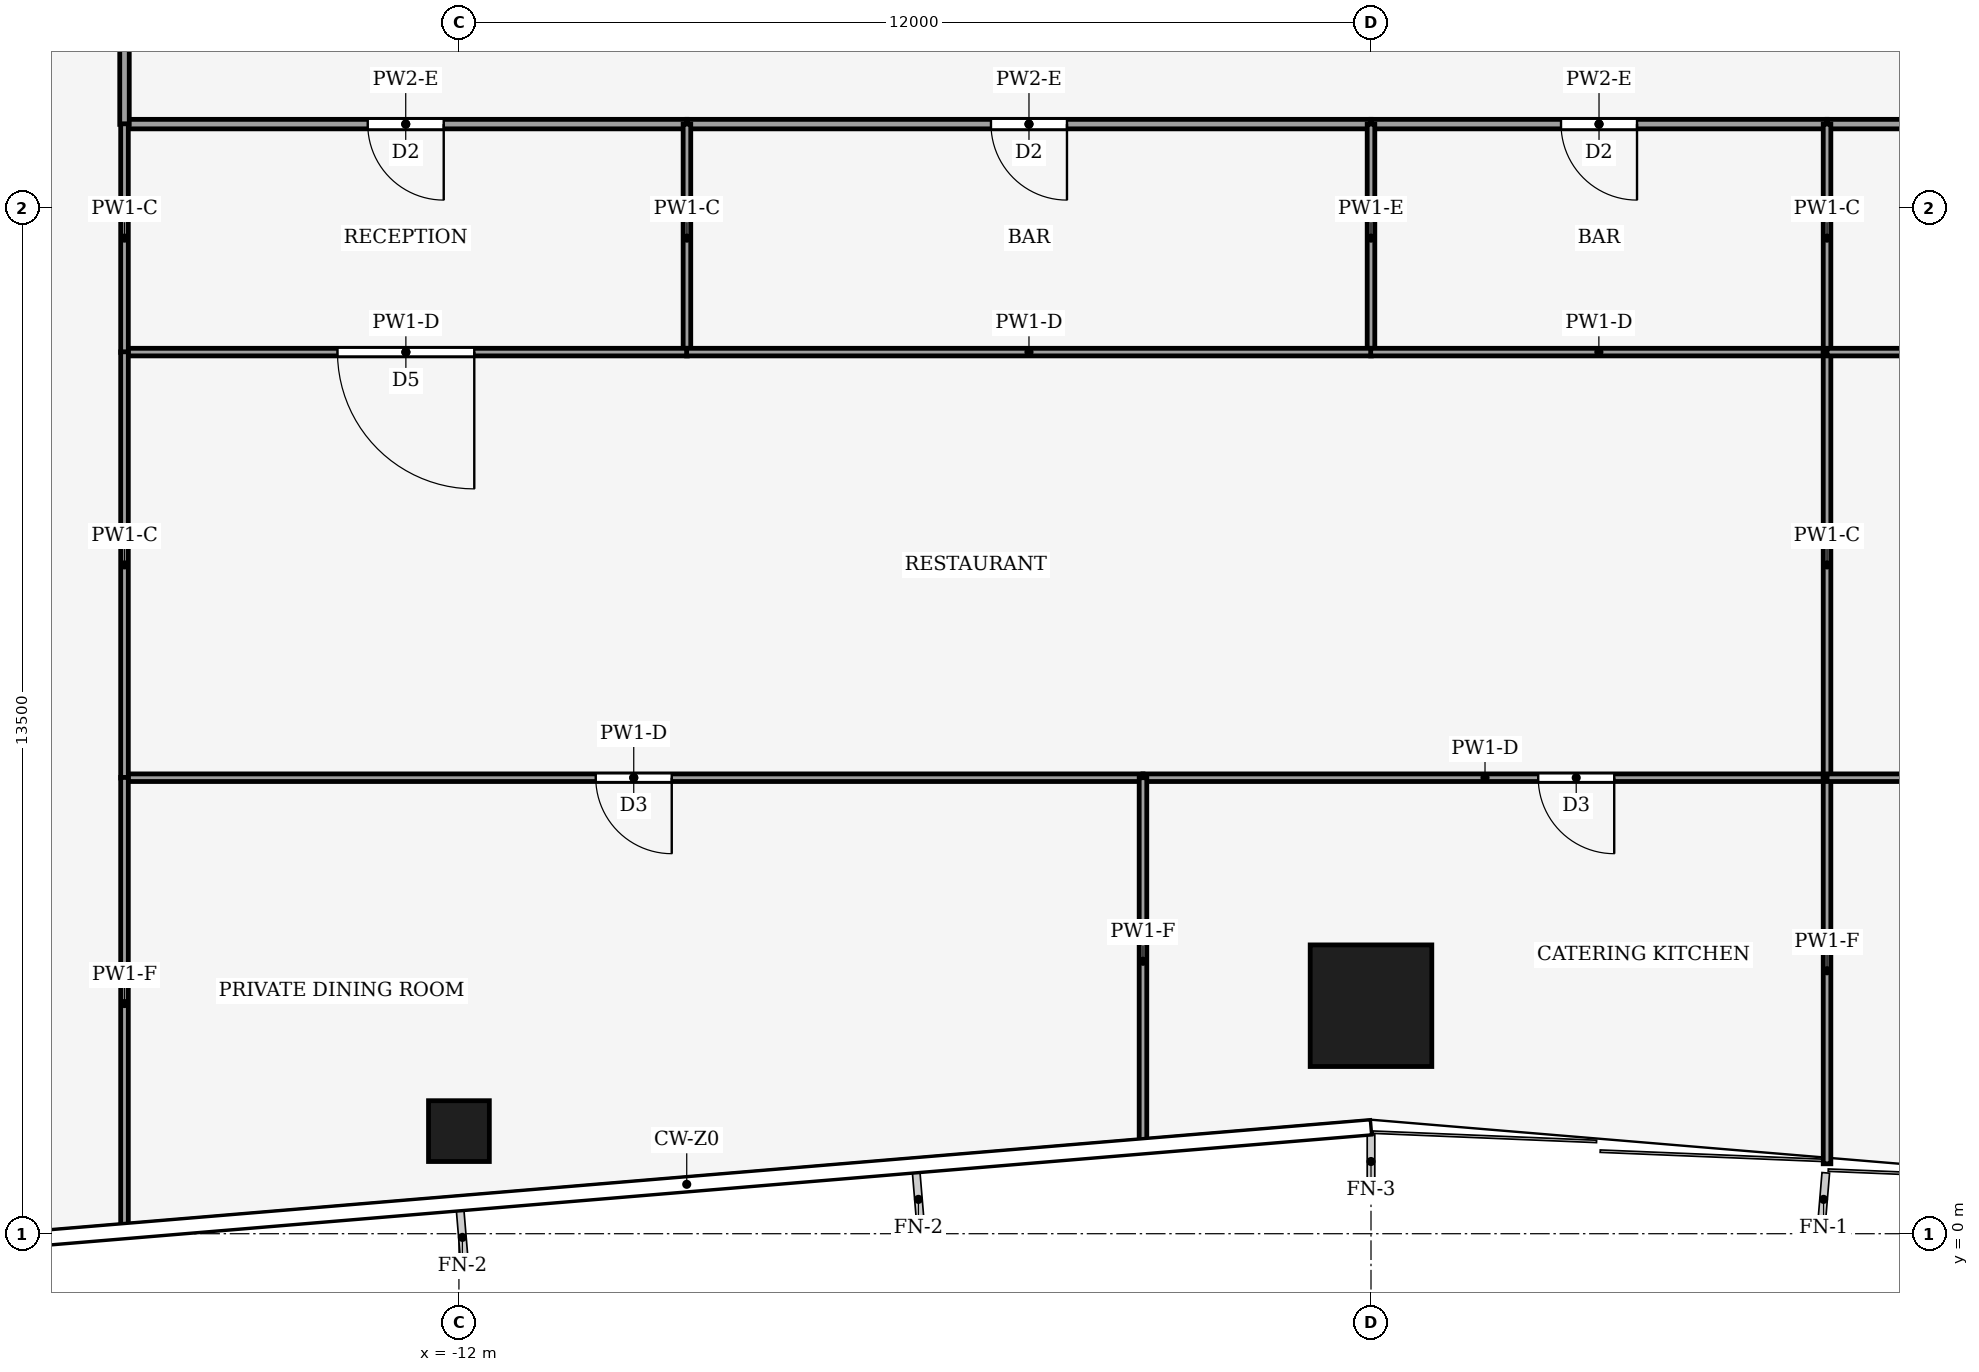
"""IFC4 building model, lengths in metres.
Left out: names, types, materials, properties, quantities, classifications, styles, units other than length and angle.
Written with IfcOpenShell. Run it as: python <this file> out.ifc"""

import sys

from ifc_helpers import new_model, si_unit, direction, frame, frame_2d, origin, origin_2d, place, context, subcontext, project, spatial, rectangle, hollow_rectangle, extrude, element, fill, save


model = new_model("IFC4")
c1 = context("Model", 3, precision=1e-05, world=origin(), true_north=direction((0.0, 1.0)))
c2 = subcontext(c1, "Body", "Model", "MODEL_VIEW")
j1 = project(units=[si_unit("LENGTHUNIT", "METRE"), si_unit("PLANEANGLEUNIT", "RADIAN")], contexts=[c1])
p1 = place(None, origin())
s1 = spatial("IfcSite", under=j1, at=p1, CompositionType="ELEMENT")
p2 = place(p1, origin())
s2 = spatial("IfcBuilding", under=s1, at=p2, CompositionType="ELEMENT")
p3 = place(p2, frame((0.0, 0.0, 14.0)))
s3 = spatial("IfcBuildingStorey", under=s2, at=p3, CompositionType="ELEMENT", Elevation=14.0)
p4 = place(p3, frame((0.0, 3.0, 0.0), z_axis=(0.0, 0.0, 1.0), x_axis=(1.0, 0.0, 0.0)))
e1 = element("IfcColumn", 1, at=p4, inside=s3, PredefinedType="COLUMN", context=c2, shape_type="SweptSolid", body=[
    extrude(hollow_rectangle(XDim=1.6, YDim=1.6, WallThickness=0.09, at=origin_2d()), origin(), (0.0, 0.0, 1.0), 4.0),
])
p5 = place(p3, frame((-12.0, 1.35, 0.0), z_axis=(0.0, 0.0, 1.0), x_axis=(1.0, 0.0, 0.0)))
e2 = element("IfcColumn", 2, at=p5, inside=s3, PredefinedType="COLUMN", context=c2, shape_type="SweptSolid", body=[
    extrude(hollow_rectangle(XDim=0.8, YDim=0.8, WallThickness=0.04, at=origin_2d()), origin(), (0.0, 0.0, 1.0), 4.0),
])
p6 = place(p3, frame((-9.0, 14.6, 0.0), z_axis=(0.0, 0.0, 1.0), x_axis=(-1.0, 0.0, 0.0)))
e3 = element("IfcWall", 3, at=p6, inside=s3, PredefinedType="PARTITIONING", context=c2, shape_type="SweptSolid", body=[
    extrude(rectangle(XDim=7.4, YDim=0.125, at=frame_2d((3.7, 0.0))), origin(), (0.0, 0.0, 1.0), 3.29),
])
p7 = place(p6, frame((3.2, 0.0, 0.0)))
e4 = element("IfcOpeningElement", 4, at=p7, cuts=e3, PredefinedType="OPENING", context=c2, shape_type="SweptSolid", body=[
    extrude(rectangle(XDim=1.0, YDim=2.1, at=frame_2d((0.5, 1.05))), frame((0.0, 0.073, 0.0), z_axis=(0.0, -1.0, 0.0), x_axis=(1.0, 0.0, 0.0)), (0.0, 0.0, 1.0), 0.145),
])
p8 = place(p3, frame((0.0, 14.6, 0.0), z_axis=(0.0, 0.0, 1.0), x_axis=(-1.0, 0.0, 0.0)))
e5 = element("IfcWall", 5, at=p8, inside=s3, PredefinedType="PARTITIONING", context=c2, shape_type="SweptSolid", body=[
    extrude(rectangle(XDim=9.0, YDim=0.125, at=frame_2d((4.5, 0.0))), origin(), (0.0, 0.0, 1.0), 3.29),
])
p9 = place(p8, frame((4.0, 0.0, 0.0)))
e6 = element("IfcOpeningElement", 6, at=p9, cuts=e5, PredefinedType="OPENING", context=c2, shape_type="SweptSolid", body=[
    extrude(rectangle(XDim=1.0, YDim=2.1, at=frame_2d((0.5, 1.05))), frame((0.0, 0.073, 0.0), z_axis=(0.0, -1.0, 0.0), x_axis=(1.0, 0.0, 0.0)), (0.0, 0.0, 1.0), 0.145),
])
p10 = place(p3, frame((6.0, 14.6, 0.0), z_axis=(0.0, 0.0, 1.0), x_axis=(-1.0, 0.0, 0.0)))
e7 = element("IfcWall", 7, at=p10, inside=s3, PredefinedType="PARTITIONING", context=c2, shape_type="SweptSolid", body=[
    extrude(rectangle(XDim=6.0, YDim=0.125, at=frame_2d((3.0, 0.0))), origin(), (0.0, 0.0, 1.0), 3.29),
])
p11 = place(p10, frame((2.5, 0.0, 0.0)))
e8 = element("IfcOpeningElement", 8, at=p11, cuts=e7, PredefinedType="OPENING", context=c2, shape_type="SweptSolid", body=[
    extrude(rectangle(XDim=1.0, YDim=2.1, at=frame_2d((0.5, 1.05))), frame((0.0, 0.073, 0.0), z_axis=(0.0, -1.0, 0.0), x_axis=(1.0, 0.0, 0.0)), (0.0, 0.0, 1.0), 0.145),
])
p12 = place(p3, frame((12.0, 14.6, 0.0), z_axis=(0.0, 0.0, 1.0), x_axis=(-1.0, 0.0, 0.0)))
e9 = element("IfcWall", 9, at=p12, inside=s3, PredefinedType="PARTITIONING", context=c2, shape_type="SweptSolid", body=[
    extrude(rectangle(XDim=6.0, YDim=0.125, at=frame_2d((3.0, 0.0))), origin(), (0.0, 0.0, 1.0), 3.29),
])
p13 = place(p12, frame((2.5, 0.0, 0.0)))
e10 = element("IfcOpeningElement", 10, at=p13, cuts=e9, PredefinedType="OPENING", context=c2, shape_type="SweptSolid", body=[
    extrude(rectangle(XDim=1.0, YDim=2.1, at=frame_2d((0.5, 1.05))), frame((0.0, 0.073, 0.0), z_axis=(0.0, -1.0, 0.0), x_axis=(1.0, 0.0, 0.0)), (0.0, 0.0, 1.0), 0.145),
])
p14 = place(p3, frame((-16.4, 14.596, 0.0), z_axis=(0.0, 0.0, 1.0), x_axis=(0.0, 1.0, 0.0)))
e11 = element("IfcWall", 11, at=p14, inside=s3, PredefinedType="PARTITIONING", context=c2, shape_type="SweptSolid", body=[
    extrude(rectangle(XDim=6.404, YDim=0.125, at=frame_2d((3.202, 0.0))), origin(), (0.0, 0.0, 1.0), 3.14),
])
p15 = place(p14, frame((2.702, 0.0, 0.0)))
e12 = element("IfcOpeningElement", 12, at=p15, cuts=e11, PredefinedType="OPENING", context=c2, shape_type="SweptSolid", body=[
    extrude(rectangle(XDim=1.0, YDim=2.1, at=frame_2d((0.5, 1.05))), frame((0.0, 0.073, 0.0), z_axis=(0.0, -1.0, 0.0), x_axis=(1.0, 0.0, 0.0)), (0.0, 0.0, 1.0), 0.145),
])
p16 = place(p3, frame((-9.0, 11.6, 0.0), z_axis=(0.0, 0.0, 1.0), x_axis=(0.0, 1.0, 0.0)))
e13 = element("IfcWall", 13, at=p16, inside=s3, PredefinedType="PARTITIONING", context=c2, shape_type="SweptSolid", body=[
    extrude(rectangle(XDim=3.0, YDim=0.1, at=frame_2d((1.5, 0.0))), origin(), (0.0, 0.0, 1.0), 3.87),
])
p17 = place(p3, frame((-8.996, 11.6, 0.0), z_axis=(0.0, 0.0, 1.0), x_axis=(-1.0, 0.0, 0.0)))
e14 = element("IfcWall", 14, at=p17, inside=s3, PredefinedType="PARTITIONING", context=c2, shape_type="SweptSolid", body=[
    extrude(rectangle(XDim=7.404, YDim=0.1, at=frame_2d((3.702, 0.0))), origin(), (0.0, 0.0, 1.0), 3.29),
])
p18 = place(p17, frame((2.802, 0.0, 0.0)))
e15 = element("IfcOpeningElement", 15, at=p18, cuts=e14, PredefinedType="OPENING", context=c2, shape_type="SweptSolid", body=[
    extrude(rectangle(XDim=1.8, YDim=2.1, at=frame_2d((0.9, 1.05))), frame((0.0, 0.06, 0.0), z_axis=(0.0, -1.0, 0.0), x_axis=(1.0, 0.0, 0.0)), (0.0, 0.0, 1.0), 0.12),
])
p19 = place(p3, frame((-16.4, 14.604, 0.0), z_axis=(0.0, 0.0, 1.0), x_axis=(0.0, -1.0, 0.0)))
e16 = element("IfcWall", 16, at=p19, inside=s3, PredefinedType="PARTITIONING", context=c2, shape_type="SweptSolid", body=[
    extrude(rectangle(XDim=3.008, YDim=0.1, at=frame_2d((1.504, 0.0))), origin(), (0.0, 0.0, 1.0), 3.87),
])
p20 = place(p3, frame((0.0, 11.6, 0.0), z_axis=(0.0, 0.0, 1.0), x_axis=(0.0, 1.0, 0.0)))
e17 = element("IfcWall", 17, at=p20, inside=s3, PredefinedType="PARTITIONING", context=c2, shape_type="SweptSolid", body=[
    extrude(rectangle(XDim=3.0, YDim=0.1, at=frame_2d((1.5, 0.0))), origin(), (0.0, 0.0, 1.0), 3.34),
])
p21 = place(p3, frame((-9.004, 11.6, 0.0), z_axis=(0.0, 0.0, 1.0), x_axis=(1.0, 0.0, 0.0)))
e18 = element("IfcWall", 18, at=p21, inside=s3, PredefinedType="PARTITIONING", context=c2, shape_type="SweptSolid", body=[
    extrude(rectangle(XDim=9.008, YDim=0.1, at=frame_2d((4.504, 0.0))), origin(), (0.0, 0.0, 1.0), 3.29),
])
p22 = place(p3, frame((-0.004, 11.6, 0.0), z_axis=(0.0, 0.0, 1.0), x_axis=(1.0, 0.0, 0.0)))
e19 = element("IfcWall", 19, at=p22, inside=s3, PredefinedType="PARTITIONING", context=c2, shape_type="SweptSolid", body=[
    extrude(rectangle(XDim=6.004, YDim=0.1, at=frame_2d((3.002, 0.0))), origin(), (0.0, 0.0, 1.0), 3.29),
])
p23 = place(p3, frame((6.0, 11.6, 0.0), z_axis=(0.0, 0.0, 1.0), x_axis=(0.0, 1.0, 0.0)))
e20 = element("IfcWall", 20, at=p23, inside=s3, PredefinedType="PARTITIONING", context=c2, shape_type="SweptSolid", body=[
    extrude(rectangle(XDim=3.0, YDim=0.1, at=frame_2d((1.5, 0.0))), origin(), (0.0, 0.0, 1.0), 3.87),
])
p24 = place(p3, frame((-3.0, 6.0, 0.0), z_axis=(0.0, 0.0, 1.0), x_axis=(-1.0, 0.0, 0.0)))
e21 = element("IfcWall", 21, at=p24, inside=s3, PredefinedType="PARTITIONING", context=c2, shape_type="SweptSolid", body=[
    extrude(rectangle(XDim=13.4, YDim=0.1, at=frame_2d((6.7, 0.0))), origin(), (0.0, 0.0, 1.0), 3.29),
])
p25 = place(p24, frame((6.2, 0.0, 0.0)))
e22 = element("IfcOpeningElement", 22, at=p25, cuts=e21, PredefinedType="OPENING", context=c2, shape_type="SweptSolid", body=[
    extrude(rectangle(XDim=1.0, YDim=2.1, at=frame_2d((0.5, 1.05))), frame((0.0, 0.06, 0.0), z_axis=(0.0, -1.0, 0.0), x_axis=(1.0, 0.0, 0.0)), (0.0, 0.0, 1.0), 0.12),
])
p26 = place(p3, frame((6.0, 6.0, 0.0), z_axis=(0.0, 0.0, 1.0), x_axis=(-1.0, 0.0, 0.0)))
e23 = element("IfcWall", 23, at=p26, inside=s3, PredefinedType="PARTITIONING", context=c2, shape_type="SweptSolid", body=[
    extrude(rectangle(XDim=9.0, YDim=0.1, at=frame_2d((4.5, 0.0))), origin(), (0.0, 0.0, 1.0), 3.29),
])
p27 = place(p26, frame((2.8, 0.0, 0.0)))
e24 = element("IfcOpeningElement", 24, at=p27, cuts=e23, PredefinedType="OPENING", context=c2, shape_type="SweptSolid", body=[
    extrude(rectangle(XDim=1.0, YDim=2.1, at=frame_2d((0.5, 1.05))), frame((0.0, 0.06, 0.0), z_axis=(0.0, -1.0, 0.0), x_axis=(1.0, 0.0, 0.0)), (0.0, 0.0, 1.0), 0.12),
])
p28 = place(p3, frame((6.0, 6.0, 0.0), z_axis=(0.0, 0.0, 1.0), x_axis=(0.0, 1.0, 0.0)))
e25 = element("IfcWall", 25, at=p28, inside=s3, PredefinedType="PARTITIONING", context=c2, shape_type="SweptSolid", body=[
    extrude(rectangle(XDim=5.6, YDim=0.1, at=frame_2d((2.8, 0.0))), origin(), (0.0, 0.0, 1.0), 3.87),
])
p29 = place(p3, frame((-16.4, 11.604, 0.0), z_axis=(0.0, 0.0, 1.0), x_axis=(0.0, -1.0, 0.0)))
e26 = element("IfcWall", 26, at=p29, inside=s3, PredefinedType="PARTITIONING", context=c2, shape_type="SweptSolid", body=[
    extrude(rectangle(XDim=5.608, YDim=0.1, at=frame_2d((2.804, 0.0))), origin(), (0.0, 0.0, 1.0), 3.87),
])
p30 = place(p3, frame((-3.0, 1.17, 0.0), z_axis=(0.0, 0.0, 1.0), x_axis=(0.0, 1.0, 0.0)))
e27 = element("IfcWall", 27, at=p30, inside=s3, PredefinedType="PARTITIONING", context=c2, shape_type="SweptSolid", body=[
    extrude(rectangle(XDim=4.83, YDim=0.1, at=frame_2d((2.415, 0.0))), origin(), (0.0, 0.0, 1.0), 3.04),
])
p31 = place(p3, frame((-16.4, 6.004, 0.0), z_axis=(0.0, 0.0, 1.0), x_axis=(0.0, -1.0, 0.0)))
e28 = element("IfcWall", 28, at=p31, inside=s3, PredefinedType="PARTITIONING", context=c2, shape_type="SweptSolid", body=[
    extrude(rectangle(XDim=5.951, YDim=0.1, at=frame_2d((2.975, 0.0))), origin(), (0.0, 0.0, 1.0), 3.04),
])
p32 = place(p3, frame((6.0, 0.92, 0.0), z_axis=(0.0, 0.0, 1.0), x_axis=(0.0, 1.0, 0.0)))
e29 = element("IfcWall", 29, at=p32, inside=s3, PredefinedType="PARTITIONING", context=c2, shape_type="SweptSolid", body=[
    extrude(rectangle(XDim=5.08, YDim=0.1, at=frame_2d((2.54, 0.0))), origin(), (0.0, 0.0, 1.0), 3.04),
])
p33 = place(p3, frame((12.004, 11.6, 0.0), z_axis=(0.0, 0.0, 1.0), x_axis=(-1.0, 0.0, 0.0)))
e30 = element("IfcWall", 30, at=p33, inside=s3, PredefinedType="PARTITIONING", context=c2, shape_type="SweptSolid", body=[
    extrude(rectangle(XDim=6.004, YDim=0.1, at=frame_2d((3.002, 0.0))), origin(), (0.0, 0.0, 1.0), 3.29),
])
p34 = place(p33, frame((2.502, 0.0, 0.0)))
e31 = element("IfcOpeningElement", 31, at=p34, cuts=e30, PredefinedType="OPENING", context=c2, shape_type="SweptSolid", body=[
    extrude(rectangle(XDim=1.0, YDim=2.1, at=frame_2d((0.5, 1.05))), frame((0.0, 0.06, 0.0), z_axis=(0.0, -1.0, 0.0), x_axis=(1.0, 0.0, 0.0)), (0.0, 0.0, 1.0), 0.12),
])
p35 = place(p3, frame((9.0, 6.0, 0.0), z_axis=(0.0, 0.0, 1.0), x_axis=(-1.0, 0.0, 0.0)))
e32 = element("IfcWall", 32, at=p35, inside=s3, PredefinedType="PARTITIONING", context=c2, shape_type="SweptSolid", body=[
    extrude(rectangle(XDim=3.0, YDim=0.1, at=frame_2d((1.5, 0.0))), origin(), (0.0, 0.0, 1.0), 3.29),
])
p36 = place(p35, frame((1.0, 0.0, 0.0)))
e33 = element("IfcOpeningElement", 33, at=p36, cuts=e32, PredefinedType="OPENING", context=c2, shape_type="SweptSolid", body=[
    extrude(rectangle(XDim=1.0, YDim=2.1, at=frame_2d((0.5, 1.05))), frame((0.0, 0.06, 0.0), z_axis=(0.0, -1.0, 0.0), x_axis=(1.0, 0.0, 0.0)), (0.0, 0.0, 1.0), 0.12),
])
p37 = place(p7, origin())
e34 = element("IfcDoor", 34, at=p37, inside=s3, OperationType="SINGLE_SWING_LEFT", PredefinedType="DOOR", context=c2, shape_type="SweptSolid", body=[
    extrude(rectangle(XDim=1.0, YDim=2.1, at=frame_2d((0.5, 1.05))), frame((0.0, 0.025, 0.0), z_axis=(0.0, -1.0, 0.0), x_axis=(1.0, 0.0, 0.0)), (0.0, 0.0, 1.0), 0.05),
])
fill(e4, e34)
p38 = place(p9, origin())
e35 = element("IfcDoor", 35, at=p38, inside=s3, OperationType="SINGLE_SWING_RIGHT", PredefinedType="DOOR", context=c2, shape_type="SweptSolid", body=[
    extrude(rectangle(XDim=1.0, YDim=2.1, at=frame_2d((0.5, 1.05))), frame((0.0, 0.025, 0.0), z_axis=(0.0, -1.0, 0.0), x_axis=(1.0, 0.0, 0.0)), (0.0, 0.0, 1.0), 0.05),
])
fill(e6, e35)
p39 = place(p11, origin())
e36 = element("IfcDoor", 36, at=p39, inside=s3, OperationType="SINGLE_SWING_LEFT", PredefinedType="DOOR", context=c2, shape_type="SweptSolid", body=[
    extrude(rectangle(XDim=1.0, YDim=2.1, at=frame_2d((0.5, 1.05))), frame((0.0, 0.025, 0.0), z_axis=(0.0, -1.0, 0.0), x_axis=(1.0, 0.0, 0.0)), (0.0, 0.0, 1.0), 0.05),
])
fill(e8, e36)
p40 = place(p18, origin())
e37 = element("IfcDoor", 37, at=p40, inside=s3, OperationType="DOUBLE_DOOR_SINGLE_SWING", PredefinedType="DOOR", context=c2, shape_type="SweptSolid", body=[
    extrude(rectangle(XDim=1.8, YDim=2.1, at=frame_2d((0.9, 1.05))), frame((0.0, 0.025, 0.0), z_axis=(0.0, -1.0, 0.0), x_axis=(1.0, 0.0, 0.0)), (0.0, 0.0, 1.0), 0.05),
])
fill(e15, e37)
p41 = place(p25, origin())
e38 = element("IfcDoor", 38, at=p41, inside=s3, OperationType="SINGLE_SWING_RIGHT", PredefinedType="DOOR", context=c2, shape_type="SweptSolid", body=[
    extrude(rectangle(XDim=1.0, YDim=2.1, at=frame_2d((0.5, 1.05))), frame((0.0, 0.025, 0.0), z_axis=(0.0, -1.0, 0.0), x_axis=(1.0, 0.0, 0.0)), (0.0, 0.0, 1.0), 0.05),
])
fill(e22, e38)
p42 = place(p27, origin())
e39 = element("IfcDoor", 39, at=p42, inside=s3, OperationType="SINGLE_SWING_LEFT", PredefinedType="DOOR", context=c2, shape_type="SweptSolid", body=[
    extrude(rectangle(XDim=1.0, YDim=2.1, at=frame_2d((0.5, 1.05))), frame((0.0, 0.025, 0.0), z_axis=(0.0, -1.0, 0.0), x_axis=(1.0, 0.0, 0.0)), (0.0, 0.0, 1.0), 0.05),
])
fill(e24, e39)
save(model, sys.argv[1])
